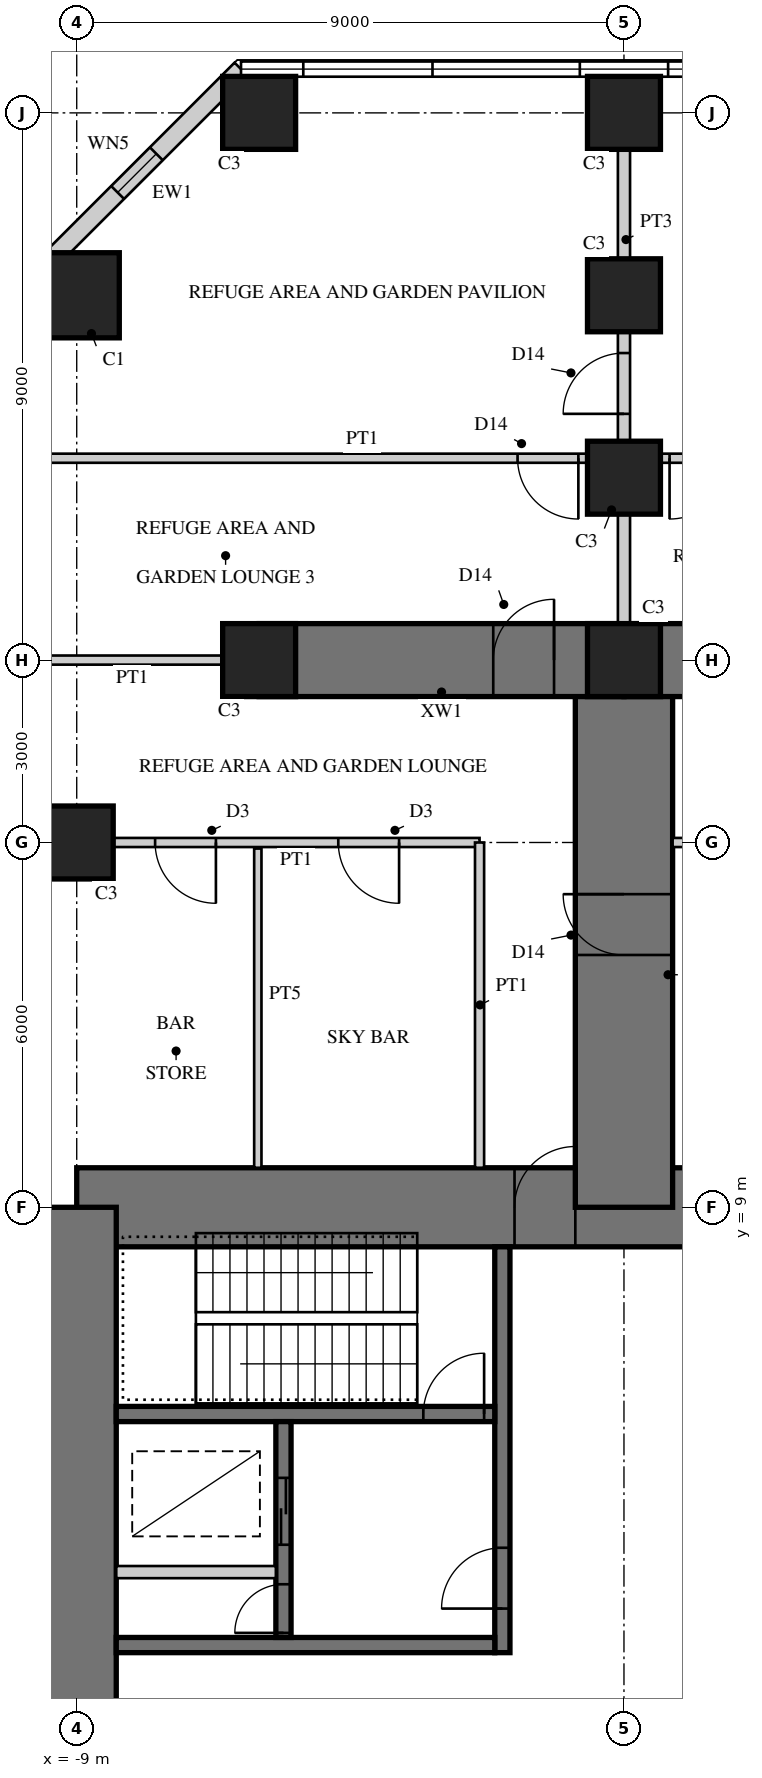
"""IFC4 building model, lengths in metres.
Left out: names, types, materials, properties, quantities, classifications, styles, units other than length and angle.
Written with IfcOpenShell. Run it as: python <this file> out.ifc"""

import sys

from ifc_helpers import new_model, si_unit, direction, frame, frame_2d, origin, origin_2d, place, context, subcontext, project, spatial, rectangle, hollow_rectangle, extrude, element, fill, save


model = new_model("IFC4")
c1 = context("Model", 3, precision=1e-05, world=origin(), true_north=direction((0.0, 1.0)))
c2 = subcontext(c1, "Body", "Model", "MODEL_VIEW")
j1 = project(units=[si_unit("LENGTHUNIT", "METRE"), si_unit("PLANEANGLEUNIT", "RADIAN")], contexts=[c1])
p1 = place(None, origin())
s1 = spatial("IfcSite", under=j1, at=p1, CompositionType="ELEMENT")
p2 = place(p1, origin())
s2 = spatial("IfcBuilding", under=s1, at=p2, CompositionType="ELEMENT")
p3 = place(p2, frame((0.0, 0.0, 95.5)))
s3 = spatial("IfcBuildingStorey", under=s2, at=p3, CompositionType="ELEMENT", Elevation=95.5)
p4 = place(p3, frame((9.0, 9.0, 0.0), z_axis=(0.0, 0.0, 1.0), x_axis=(-1.0, 0.0, 0.0)))
e1 = element("IfcWall", 1, at=p4, inside=s3, PredefinedType="SHEAR", context=c2, shape_type="SweptSolid", body=[
    extrude(rectangle(XDim=18.0, YDim=1.3, at=frame_2d((9.0, 0.0))), origin(), (0.0, 0.0, 1.0), 5.0),
])
p5 = place(p4, frame((9.8, 0.0, 0.0)))
e2 = element("IfcOpeningElement", 2, at=p5, cuts=e1, PredefinedType="OPENING", context=c2, shape_type="SweptSolid", body=[
    extrude(rectangle(XDim=1.0, YDim=2.4, at=frame_2d((0.5, 1.2))), frame((0.0, 0.66, 0.0), z_axis=(0.0, -1.0, 0.0), x_axis=(1.0, 0.0, 0.0)), (0.0, 0.0, 1.0), 1.32),
])
p6 = place(p3, frame((-9.0, 9.0, 0.0), z_axis=(0.0, 0.0, 1.0), x_axis=(0.0, -1.0, 0.0)))
e3 = element("IfcWall", 3, at=p6, inside=s3, PredefinedType="SHEAR", context=c2, shape_type="SweptSolid", body=[
    extrude(rectangle(XDim=18.0, YDim=1.3, at=frame_2d((9.0, 0.0))), origin(), (0.0, 0.0, 1.0), 5.0),
])
p7 = place(p6, frame((9.8, 0.0, 0.0)))
e4 = element("IfcOpeningElement", 4, at=p7, cuts=e3, PredefinedType="OPENING", context=c2, shape_type="SweptSolid", body=[
    extrude(rectangle(XDim=1.0, YDim=2.4, at=frame_2d((0.5, 1.2))), frame((0.0, 0.66, 0.0), z_axis=(0.0, -1.0, 0.0), x_axis=(1.0, 0.0, 0.0)), (0.0, 0.0, 1.0), 1.32),
])
p8 = place(p3, frame((-2.0, 1.675, 0.0), z_axis=(0.0, 0.0, 1.0), x_axis=(0.0, 1.0, 0.0)))
e5 = element("IfcWall", 5, at=p8, inside=s3, PredefinedType="SHEAR", context=c2, shape_type="SweptSolid", body=[
    extrude(rectangle(XDim=6.675, YDim=0.25, at=frame_2d((3.337, 0.0))), origin(), (0.0, 0.0, 1.0), 5.0),
])
p9 = place(p8, frame((0.725, 0.0, 0.0)))
e6 = element("IfcOpeningElement", 6, at=p9, cuts=e5, PredefinedType="OPENING", context=c2, shape_type="SweptSolid", body=[
    extrude(rectangle(XDim=1.0, YDim=2.1, at=frame_2d((0.5, 1.05))), frame((0.0, 0.135, 0.0), z_axis=(0.0, -1.0, 0.0), x_axis=(1.0, 0.0, 0.0)), (0.0, 0.0, 1.0), 0.27),
])
p10 = place(p3, frame((-2.125, 1.8, 0.0), z_axis=(0.0, 0.0, 1.0), x_axis=(-1.0, 0.0, 0.0)))
e7 = element("IfcWall", 7, at=p10, inside=s3, PredefinedType="SHEAR", context=c2, shape_type="SweptSolid", body=[
    extrude(rectangle(XDim=6.225, YDim=0.25, at=frame_2d((3.113, 0.0))), origin(), (0.0, 0.0, 1.0), 5.0),
])
p11 = place(p3, frame((-2.125, 5.6, 0.0), z_axis=(0.0, 0.0, 1.0), x_axis=(-1.0, 0.0, 0.0)))
e8 = element("IfcWall", 8, at=p11, inside=s3, PredefinedType="SHEAR", context=c2, shape_type="SweptSolid", body=[
    extrude(rectangle(XDim=6.225, YDim=0.25, at=frame_2d((3.113, 0.0))), origin(), (0.0, 0.0, 1.0), 5.0),
])
p12 = place(p11, frame((0.175, 0.0, 0.0)))
e9 = element("IfcOpeningElement", 9, at=p12, cuts=e8, PredefinedType="OPENING", context=c2, shape_type="SweptSolid", body=[
    extrude(rectangle(XDim=1.0, YDim=2.1, at=frame_2d((0.5, 1.05))), frame((0.0, 0.135, 0.0), z_axis=(0.0, -1.0, 0.0), x_axis=(1.0, 0.0, 0.0)), (0.0, 0.0, 1.0), 0.27),
])
p13 = place(p3, frame((-5.6, 1.925, 0.0), z_axis=(0.0, 0.0, 1.0), x_axis=(0.0, 1.0, 0.0)))
e10 = element("IfcWall", 10, at=p13, inside=s3, PredefinedType="SHEAR", context=c2, shape_type="SweptSolid", body=[
    extrude(rectangle(XDim=3.55, YDim=0.25, at=frame_2d((1.775, 0.0))), origin(), (0.0, 0.0, 1.0), 5.0),
])
p14 = place(p13, frame((1.525, 0.0, 0.0)))
e11 = element("IfcOpeningElement", 11, at=p14, cuts=e10, PredefinedType="OPENING", context=c2, shape_type="SweptSolid", body=[
    extrude(rectangle(XDim=1.1, YDim=2.2, at=frame_2d((0.55, 1.1))), frame((0.0, 0.135, 0.0), z_axis=(0.0, -1.0, 0.0), x_axis=(1.0, 0.0, 0.0)), (0.0, 0.0, 1.0), 0.27),
])
p15 = place(p13, frame((0.075, 0.0, 0.0)))
e12 = element("IfcOpeningElement", 12, at=p15, cuts=e10, PredefinedType="OPENING", context=c2, shape_type="SweptSolid", body=[
    extrude(rectangle(XDim=0.8, YDim=2.1, at=frame_2d((0.4, 1.05))), frame((0.0, 0.135, 0.0), z_axis=(0.0, -1.0, 0.0), x_axis=(1.0, 0.0, 0.0)), (0.0, 0.0, 1.0), 0.27),
])
p16 = place(p3, frame((-5.725, 3.0, 0.0), z_axis=(0.0, 0.0, 1.0), x_axis=(-1.0, 0.0, 0.0)))
e13 = element("IfcWall", 13, at=p16, inside=s3, PredefinedType="PARTITIONING", context=c2, shape_type="SweptSolid", body=[
    extrude(rectangle(XDim=2.625, YDim=0.2, at=frame_2d((1.312, 0.0))), origin(), (0.0, 0.0, 1.0), 5.0),
])
p17 = place(p3, frame((0.0, 9.0, 0.0), z_axis=(0.0, 0.0, 1.0), x_axis=(0.0, 1.0, 0.0)))
e14 = element("IfcWall", 14, at=p17, inside=s3, PredefinedType="SHEAR", context=c2, shape_type="SweptSolid", body=[
    extrude(rectangle(XDim=9.0, YDim=1.6, at=frame_2d((4.5, 0.0))), origin(), (0.0, 0.0, 1.0), 5.0),
])
p18 = place(p17, frame((4.15, 0.0, 0.0)))
e15 = element("IfcOpeningElement", 15, at=p18, cuts=e14, PredefinedType="OPENING", context=c2, shape_type="SweptSolid", body=[
    extrude(rectangle(XDim=1.0, YDim=2.2, at=frame_2d((0.5, 1.1))), frame((0.0, 0.81, 0.0), z_axis=(0.0, -1.0, 0.0), x_axis=(1.0, 0.0, 0.0)), (0.0, 0.0, 1.0), 1.62),
])
p19 = place(p3, frame((0.0, 18.0, 0.0), z_axis=(0.0, 0.0, 1.0), x_axis=(-1.0, 0.0, 0.0)))
e16 = element("IfcWall", 16, at=p19, inside=s3, PredefinedType="SHEAR", context=c2, shape_type="SweptSolid", body=[
    extrude(rectangle(XDim=6.0, YDim=1.2, at=frame_2d((3.0, 0.0))), origin(), (0.0, 0.0, 1.0), 5.0),
])
p20 = place(p19, frame((1.15, 0.0, 0.0)))
e17 = element("IfcOpeningElement", 17, at=p20, cuts=e16, PredefinedType="OPENING", context=c2, shape_type="SweptSolid", body=[
    extrude(rectangle(XDim=1.0, YDim=2.2, at=frame_2d((0.5, 1.1))), frame((0.0, 0.61, 0.0), z_axis=(0.0, -1.0, 0.0), x_axis=(1.0, 0.0, 0.0)), (0.0, 0.0, 1.0), 1.22),
])
p21 = place(p3, frame((0.0, 18.0, 0.0), z_axis=(0.0, 0.0, 1.0), x_axis=(1.0, 0.0, 0.0)))
e18 = element("IfcWall", 18, at=p21, inside=s3, PredefinedType="SHEAR", context=c2, shape_type="SweptSolid", body=[
    extrude(rectangle(XDim=6.0, YDim=1.2, at=frame_2d((3.0, 0.0))), origin(), (0.0, 0.0, 1.0), 5.0),
])
p22 = place(p21, frame((1.15, 0.0, 0.0)))
e19 = element("IfcOpeningElement", 19, at=p22, cuts=e18, PredefinedType="OPENING", context=c2, shape_type="SweptSolid", body=[
    extrude(rectangle(XDim=1.0, YDim=2.2, at=frame_2d((0.5, 1.1))), frame((0.0, 0.61, 0.0), z_axis=(0.0, -1.0, 0.0), x_axis=(1.0, 0.0, 0.0)), (0.0, 0.0, 1.0), 1.22),
])
p23 = place(p3, frame((-9.0, 15.0, 0.0), z_axis=(0.0, 0.0, 1.0), x_axis=(1.0, 0.0, 0.0)))
e20 = element("IfcColumn", 20, at=p23, inside=s3, PredefinedType="COLUMN", context=c2, shape_type="SweptSolid", body=[
    extrude(rectangle(XDim=1.2, YDim=1.2, at=origin_2d()), origin(), (0.0, 0.0, 1.0), 5.0),
])
p24 = place(p3, frame((-9.0, 24.0, 0.0), z_axis=(0.0, 0.0, 1.0), x_axis=(1.0, 0.0, 0.0)))
e21 = element("IfcColumn", 21, at=p24, inside=s3, PredefinedType="COLUMN", context=c2, shape_type="SweptSolid", body=[
    extrude(rectangle(XDim=1.4, YDim=1.4, at=origin_2d()), origin(), (0.0, 0.0, 1.0), 5.0),
])
for number, where, z_axis, x_axis in (
    (22, (0.0, 27.0, 0.0), (0.0, 0.0, 1.0), (1.0, 0.0, 0.0)),
    (23, (-6.0, 27.0, 0.0), (0.0, 0.0, 1.0), (1.0, 0.0, 0.0)),
    (24, (0.0, 18.0, 0.0), (0.0, 0.0, 1.0), (1.0, 0.0, 0.0)),
    (25, (-6.0, 18.0, 0.0), (0.0, 0.0, 1.0), (1.0, 0.0, 0.0)),
    (26, (0.0, 21.0, 0.0), (0.0, 0.0, 1.0), (1.0, 0.0, 0.0)),
    (27, (0.0, 24.0, 0.0), (0.0, 0.0, 1.0), (1.0, 0.0, 0.0)),
):
    element("IfcColumn", number, at=place(p3, frame(where, z_axis=z_axis, x_axis=x_axis)), inside=s3, PredefinedType="COLUMN", context=c2, shape_type="SweptSolid", body=[
        extrude(rectangle(XDim=1.2, YDim=1.2, at=origin_2d()), origin(), (0.0, 0.0, 1.0), 5.0),
    ])
p25 = place(p3, frame((-6.298, 27.72, 0.0), z_axis=(0.0, 0.0, 1.0), x_axis=(-0.707106781187, -0.707106781187, 0.0)))
e28 = element("IfcWall", 28, at=p25, inside=s3, PredefinedType="SOLIDWALL", context=c2, shape_type="SweptSolid", body=[
    extrude(rectangle(XDim=4.839, YDim=0.3, at=frame_2d((2.419, 0.0))), origin(), (0.0, 0.0, 1.0), 4.8),
])
p26 = place(p25, frame((1.969, 0.0, 0.3)))
e29 = element("IfcOpeningElement", 29, at=p26, cuts=e28, PredefinedType="OPENING", context=c2, shape_type="SweptSolid", body=[
    extrude(rectangle(XDim=0.9, YDim=2.4, at=frame_2d((0.45, 1.2))), frame((0.0, 0.16, 0.0), z_axis=(0.0, -1.0, 0.0), x_axis=(1.0, 0.0, 0.0)), (0.0, 0.0, 1.0), 0.32),
])
p27 = place(p3, frame((-2.375, 15.0, 0.0), z_axis=(0.0, 0.0, 1.0), x_axis=(-1.0, 0.0, 0.0)))
e30 = element("IfcWall", 30, at=p27, inside=s3, PredefinedType="PARTITIONING", context=c2, shape_type="SweptSolid", body=[
    extrude(rectangle(XDim=6.025, YDim=0.15, at=frame_2d((3.012, 0.0))), origin(), (0.0, 0.0, 1.0), 3.95),
])
p28 = place(p27, frame((1.323, 0.0, 0.0)))
e31 = element("IfcOpeningElement", 31, at=p28, cuts=e30, PredefinedType="OPENING", context=c2, shape_type="SweptSolid", body=[
    extrude(rectangle(XDim=1.0, YDim=2.1, at=frame_2d((0.5, 1.05))), frame((0.0, 0.085, 0.0), z_axis=(0.0, -1.0, 0.0), x_axis=(1.0, 0.0, 0.0)), (0.0, 0.0, 1.0), 0.17),
])
p29 = place(p27, frame((4.336, 0.0, 0.0)))
e32 = element("IfcOpeningElement", 32, at=p29, cuts=e30, PredefinedType="OPENING", context=c2, shape_type="SweptSolid", body=[
    extrude(rectangle(XDim=1.0, YDim=2.1, at=frame_2d((0.5, 1.05))), frame((0.0, 0.085, 0.0), z_axis=(0.0, -1.0, 0.0), x_axis=(1.0, 0.0, 0.0)), (0.0, 0.0, 1.0), 0.17),
])
p30 = place(p3, frame((-2.375, 9.65, 0.0), z_axis=(0.0, 0.0, 1.0), x_axis=(0.0, 1.0, 0.0)))
e33 = element("IfcWall", 33, at=p30, inside=s3, PredefinedType="PARTITIONING", context=c2, shape_type="SweptSolid", body=[
    extrude(rectangle(XDim=5.35, YDim=0.15, at=frame_2d((2.675, 0.0))), origin(), (0.0, 0.0, 1.0), 4.8),
])
p31 = place(p3, frame((-6.022, 9.65, 0.0), z_axis=(0.0, 0.0, 1.0), x_axis=(0.0, 1.0, 0.0)))
e34 = element("IfcWall", 34, at=p31, inside=s3, PredefinedType="PLUMBINGWALL", context=c2, shape_type="SweptSolid", body=[
    extrude(rectangle(XDim=5.25, YDim=0.12, at=frame_2d((2.625, 0.0))), origin(), (0.0, 0.0, 1.0), 3.9),
])
p32 = place(p3, frame((8.4, 15.0, 0.0), z_axis=(0.0, 0.0, 1.0), x_axis=(-1.0, 0.0, 0.0)))
e35 = element("IfcWall", 35, at=p32, inside=s3, PredefinedType="PARTITIONING", context=c2, shape_type="SweptSolid", body=[
    extrude(rectangle(XDim=7.6, YDim=0.15, at=frame_2d((3.8, 0.0))), origin(), (0.0, 0.0, 1.0), 3.95),
])
p33 = place(p32, frame((3.3, 0.0, 0.0)))
e36 = element("IfcOpeningElement", 36, at=p33, cuts=e35, PredefinedType="OPENING", context=c2, shape_type="SweptSolid", body=[
    extrude(rectangle(XDim=1.0, YDim=2.1, at=frame_2d((0.5, 1.05))), frame((0.0, 0.085, 0.0), z_axis=(0.0, -1.0, 0.0), x_axis=(1.0, 0.0, 0.0)), (0.0, 0.0, 1.0), 0.17),
])
p34 = place(p3, frame((-0.1, 21.32, 0.0), z_axis=(0.0, 0.0, 1.0), x_axis=(-1.0, 0.0, 0.0)))
e37 = element("IfcWall", 37, at=p34, inside=s3, PredefinedType="PARTITIONING", context=c2, shape_type="SweptSolid", body=[
    extrude(rectangle(XDim=9.47, YDim=0.15, at=frame_2d((4.735, 0.0))), origin(), (0.0, 0.0, 1.0), 4.8),
])
p35 = place(p34, frame((0.65, 0.0, 0.0)))
e38 = element("IfcOpeningElement", 38, at=p35, cuts=e37, PredefinedType="OPENING", context=c2, shape_type="SweptSolid", body=[
    extrude(rectangle(XDim=1.0, YDim=2.2, at=frame_2d((0.5, 1.1))), frame((0.0, 0.085, 0.0), z_axis=(0.0, -1.0, 0.0), x_axis=(1.0, 0.0, 0.0)), (0.0, 0.0, 1.0), 0.17),
])
p36 = place(p3, frame((9.57, 21.32, 0.0), z_axis=(0.0, 0.0, 1.0), x_axis=(-1.0, 0.0, 0.0)))
e39 = element("IfcWall", 39, at=p36, inside=s3, PredefinedType="PARTITIONING", context=c2, shape_type="SweptSolid", body=[
    extrude(rectangle(XDim=9.47, YDim=0.15, at=frame_2d((4.735, 0.0))), origin(), (0.0, 0.0, 1.0), 4.8),
])
p37 = place(p36, frame((7.82, 0.0, 0.0)))
e40 = element("IfcOpeningElement", 40, at=p37, cuts=e39, PredefinedType="OPENING", context=c2, shape_type="SweptSolid", body=[
    extrude(rectangle(XDim=1.0, YDim=2.2, at=frame_2d((0.5, 1.1))), frame((0.0, 0.085, 0.0), z_axis=(0.0, -1.0, 0.0), x_axis=(1.0, 0.0, 0.0)), (0.0, 0.0, 1.0), 0.17),
])
p38 = place(p3, frame((-6.6, 18.0, 0.0), z_axis=(0.0, 0.0, 1.0), x_axis=(-1.0, 0.0, 0.0)))
e41 = element("IfcWall", 41, at=p38, inside=s3, PredefinedType="PARTITIONING", context=c2, shape_type="SweptSolid", body=[
    extrude(rectangle(XDim=2.97, YDim=0.15, at=frame_2d((1.485, 0.0))), origin(), (0.0, 0.0, 1.0), 4.8),
])
p39 = place(p3, frame((0.0, 18.0, 0.0), z_axis=(0.0, 0.0, 1.0), x_axis=(0.0, 1.0, 0.0)))
e42 = element("IfcWall", 42, at=p39, inside=s3, PredefinedType="SOLIDWALL", context=c2, shape_type="SweptSolid", body=[
    extrude(rectangle(XDim=3.0, YDim=0.2, at=frame_2d((1.5, 0.0))), origin(), (0.0, 0.0, 1.0), 4.8),
])
p40 = place(p3, frame((0.0, 21.0, 0.0), z_axis=(0.0, 0.0, 1.0), x_axis=(0.0, 1.0, 0.0)))
e43 = element("IfcWall", 43, at=p40, inside=s3, PredefinedType="SOLIDWALL", context=c2, shape_type="SweptSolid", body=[
    extrude(rectangle(XDim=6.0, YDim=0.2, at=frame_2d((3.0, 0.0))), origin(), (0.0, 0.0, 1.0), 3.9),
])
p41 = place(p40, frame((1.05, 0.0, 0.0)))
e44 = element("IfcOpeningElement", 44, at=p41, cuts=e43, PredefinedType="OPENING", context=c2, shape_type="SweptSolid", body=[
    extrude(rectangle(XDim=1.0, YDim=2.2, at=frame_2d((0.5, 1.1))), frame((0.0, 0.11, 0.0), z_axis=(0.0, -1.0, 0.0), x_axis=(1.0, 0.0, 0.0)), (0.0, 0.0, 1.0), 0.22),
])
p42 = place(p26, origin())
e45 = element("IfcWindow", 45, at=p42, inside=s3, PartitioningType="SINGLE_PANEL", PredefinedType="WINDOW", context=c2, shape_type="SweptSolid", body=[
    extrude(hollow_rectangle(XDim=0.9, YDim=2.4, WallThickness=0.06, at=frame_2d((0.45, 1.2))), frame((0.0, 0.03, 0.0), z_axis=(0.0, -1.0, 0.0), x_axis=(1.0, 0.0, 0.0)), (0.0, 0.0, 1.0), 0.06),
    extrude(rectangle(XDim=0.779, YDim=2.279, at=frame_2d((0.45, 1.2))), frame((0.0, 0.03, 0.0), z_axis=(0.0, -1.0, 0.0), x_axis=(1.0, 0.0, 0.0)), (0.0, 0.0, 1.0), 0.06),
])
fill(e29, e45)
p43 = place(p28, origin())
e46 = element("IfcDoor", 46, at=p43, inside=s3, OperationType="SINGLE_SWING_LEFT", PredefinedType="DOOR", context=c2, shape_type="SweptSolid", body=[
    extrude(rectangle(XDim=1.0, YDim=2.1, at=frame_2d((0.5, 1.05))), frame((0.0, 0.025, 0.0), z_axis=(0.0, -1.0, 0.0), x_axis=(1.0, 0.0, 0.0)), (0.0, 0.0, 1.0), 0.05),
])
fill(e31, e46)
p44 = place(p29, origin())
e47 = element("IfcDoor", 47, at=p44, inside=s3, OperationType="SINGLE_SWING_LEFT", PredefinedType="DOOR", context=c2, shape_type="SweptSolid", body=[
    extrude(rectangle(XDim=1.0, YDim=2.1, at=frame_2d((0.5, 1.05))), frame((0.0, 0.025, 0.0), z_axis=(0.0, -1.0, 0.0), x_axis=(1.0, 0.0, 0.0)), (0.0, 0.0, 1.0), 0.05),
])
fill(e32, e47)
p45 = place(p35, origin())
e48 = element("IfcDoor", 48, at=p45, inside=s3, OperationType="SINGLE_SWING_LEFT", PredefinedType="DOOR", context=c2, shape_type="SweptSolid", body=[
    extrude(rectangle(XDim=1.0, YDim=2.2, at=frame_2d((0.5, 1.1))), frame((0.0, 0.025, 0.0), z_axis=(0.0, -1.0, 0.0), x_axis=(1.0, 0.0, 0.0)), (0.0, 0.0, 1.0), 0.05),
])
fill(e38, e48)
p46 = place(p37, origin())
e49 = element("IfcDoor", 49, at=p46, inside=s3, OperationType="SINGLE_SWING_RIGHT", PredefinedType="DOOR", context=c2, shape_type="SweptSolid", body=[
    extrude(rectangle(XDim=1.0, YDim=2.2, at=frame_2d((0.5, 1.1))), frame((0.0, 0.025, 0.0), z_axis=(0.0, -1.0, 0.0), x_axis=(1.0, 0.0, 0.0)), (0.0, 0.0, 1.0), 0.05),
])
fill(e40, e49)
p47 = place(p18, origin())
e50 = element("IfcDoor", 50, at=p47, inside=s3, OperationType="SINGLE_SWING_RIGHT", PredefinedType="DOOR", context=c2, shape_type="SweptSolid", body=[
    extrude(rectangle(XDim=1.0, YDim=2.2, at=frame_2d((0.5, 1.1))), frame((0.0, 0.025, 0.0), z_axis=(0.0, -1.0, 0.0), x_axis=(1.0, 0.0, 0.0)), (0.0, 0.0, 1.0), 0.05),
])
fill(e15, e50)
p48 = place(p41, origin())
e51 = element("IfcDoor", 51, at=p48, inside=s3, OperationType="SINGLE_SWING_LEFT", PredefinedType="DOOR", context=c2, shape_type="SweptSolid", body=[
    extrude(rectangle(XDim=1.0, YDim=2.2, at=frame_2d((0.5, 1.1))), frame((0.0, 0.025, 0.0), z_axis=(0.0, -1.0, 0.0), x_axis=(1.0, 0.0, 0.0)), (0.0, 0.0, 1.0), 0.05),
])
fill(e44, e51)
p49 = place(p20, frame((1.0, 0.0, 0.0), z_axis=(0.0, 0.0, 1.0), x_axis=(-1.0, 0.0, 0.0)))
e52 = element("IfcDoor", 52, at=p49, inside=s3, OperationType="SINGLE_SWING_RIGHT", PredefinedType="DOOR", context=c2, shape_type="SweptSolid", body=[
    extrude(rectangle(XDim=1.0, YDim=2.2, at=frame_2d((0.5, 1.1))), frame((0.0, 0.025, 0.0), z_axis=(0.0, -1.0, 0.0), x_axis=(1.0, 0.0, 0.0)), (0.0, 0.0, 1.0), 0.05),
])
fill(e17, e52)
p50 = place(p5, frame((1.0, 0.0, 0.0), z_axis=(0.0, 0.0, 1.0), x_axis=(-1.0, 0.0, 0.0)))
e53 = element("IfcDoor", 53, at=p50, inside=s3, OperationType="SINGLE_SWING_RIGHT", PredefinedType="DOOR", context=c2, shape_type="SweptSolid", body=[
    extrude(rectangle(XDim=1.0, YDim=2.4, at=frame_2d((0.5, 1.2))), frame((0.0, -0.005, 0.0), z_axis=(0.0, -1.0, 0.0), x_axis=(1.0, 0.0, 0.0)), (0.0, 0.0, 1.0), 0.05),
])
fill(e2, e53)
p51 = place(p9, origin())
e54 = element("IfcDoor", 54, at=p51, inside=s3, OperationType="SINGLE_SWING_LEFT", PredefinedType="DOOR", context=c2, shape_type="SweptSolid", body=[
    extrude(rectangle(XDim=1.0, YDim=2.1, at=frame_2d((0.5, 1.05))), frame((0.0, 0.025, 0.0), z_axis=(0.0, -1.0, 0.0), x_axis=(1.0, 0.0, 0.0)), (0.0, 0.0, 1.0), 0.05),
])
fill(e6, e54)
p52 = place(p12, frame((1.0, 0.0, 0.0), z_axis=(0.0, 0.0, 1.0), x_axis=(-1.0, 0.0, 0.0)))
e55 = element("IfcDoor", 55, at=p52, inside=s3, OperationType="SINGLE_SWING_RIGHT", PredefinedType="DOOR", context=c2, shape_type="SweptSolid", body=[
    extrude(rectangle(XDim=1.0, YDim=2.1, at=frame_2d((0.5, 1.05))), frame((0.0, 0.025, 0.0), z_axis=(0.0, -1.0, 0.0), x_axis=(1.0, 0.0, 0.0)), (0.0, 0.0, 1.0), 0.05),
])
fill(e9, e55)
p53 = place(p14, origin())
e56 = element("IfcDoor", 56, at=p53, inside=s3, OperationType="DOUBLE_DOOR_SLIDING", PredefinedType="DOOR", context=c2, shape_type="SweptSolid", body=[
    extrude(rectangle(XDim=1.1, YDim=2.2, at=frame_2d((0.55, 1.1))), frame((0.0, 0.025, 0.0), z_axis=(0.0, -1.0, 0.0), x_axis=(1.0, 0.0, 0.0)), (0.0, 0.0, 1.0), 0.05),
])
fill(e11, e56)
p54 = place(p15, origin())
e57 = element("IfcDoor", 57, at=p54, inside=s3, OperationType="SINGLE_SWING_LEFT", PredefinedType="DOOR", context=c2, shape_type="SweptSolid", body=[
    extrude(rectangle(XDim=0.8, YDim=2.1, at=frame_2d((0.4, 1.05))), frame((0.0, 0.025, 0.0), z_axis=(0.0, -1.0, 0.0), x_axis=(1.0, 0.0, 0.0)), (0.0, 0.0, 1.0), 0.05),
])
fill(e12, e57)
save(model, sys.argv[1])
